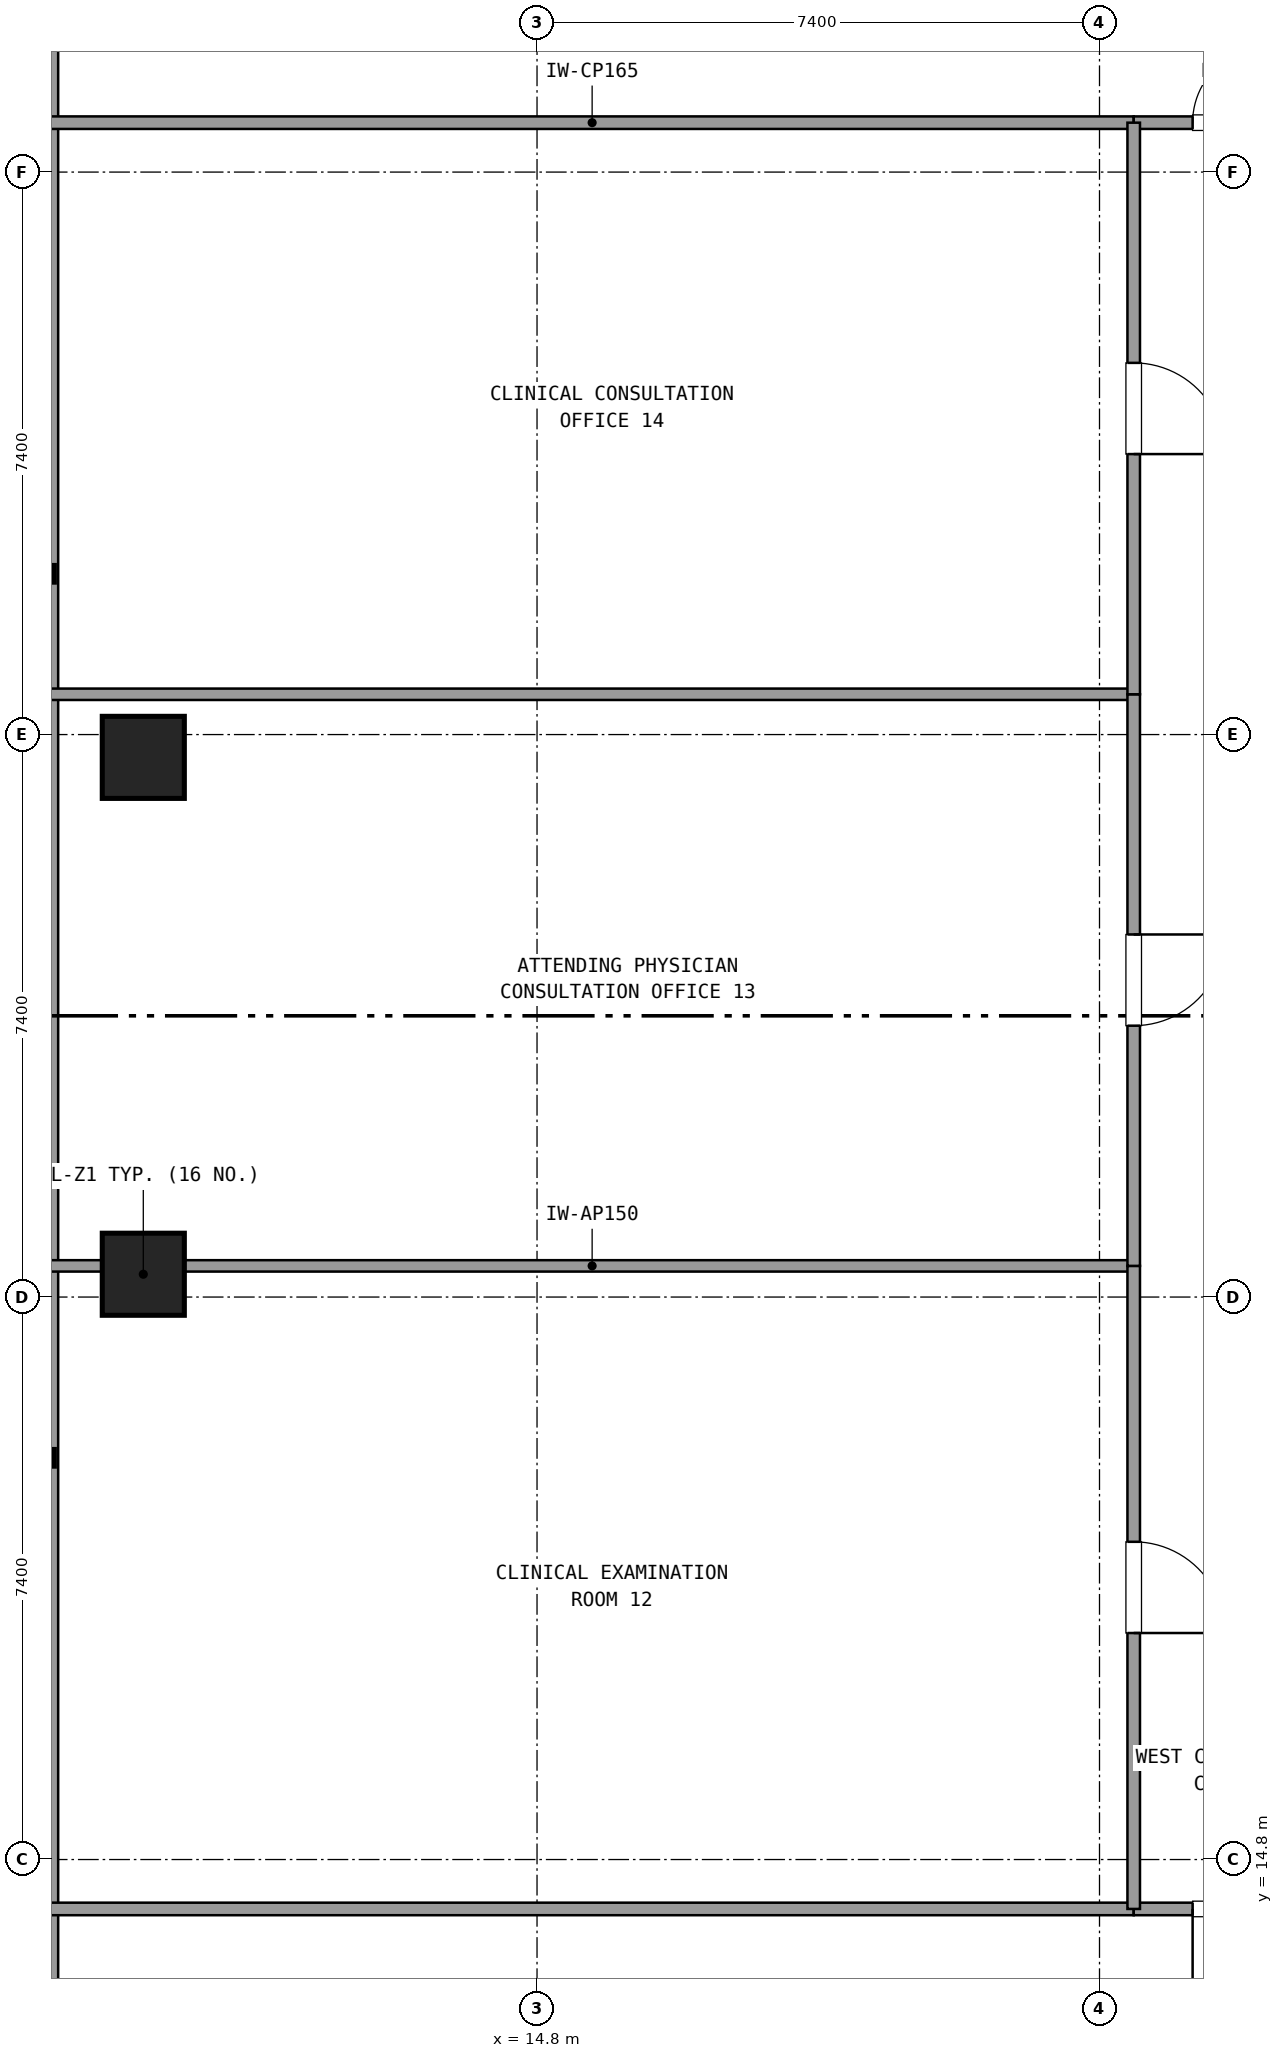
"""IFC4 building model, lengths in metres.
Left out: names, types, materials, properties, quantities, classifications, styles, units other than length and angle.
Written with IfcOpenShell. Run it as: python <this file> out.ifc"""

import sys

from ifc_helpers import new_model, si_unit, direction, frame, frame_2d, origin, origin_2d, place, context, subcontext, project, spatial, rectangle, extrude, element, fill, save


model = new_model("IFC4")
c1 = context("Model", 3, precision=1e-05, world=origin(), true_north=direction((0.0, 1.0)))
c2 = subcontext(c1, "Body", "Model", "MODEL_VIEW")
j1 = project(units=[si_unit("LENGTHUNIT", "METRE"), si_unit("PLANEANGLEUNIT", "RADIAN")], contexts=[c1])
p1 = place(None, origin())
s1 = spatial("IfcSite", under=j1, at=p1, CompositionType="ELEMENT")
p2 = place(p1, origin())
s2 = spatial("IfcBuilding", under=s1, at=p2, CompositionType="ELEMENT")
p3 = place(p2, frame((0.0, 0.0, 23.94)))
s3 = spatial("IfcBuildingStorey", under=s2, at=p3, CompositionType="ELEMENT", Elevation=23.94)
for number, where, z_axis, x_axis in (
    (1, (9.62, 22.5, 0.0), (0.0, 0.0, 1.0), (1.0, 0.0, 0.0)),
    (2, (9.62, 29.3, 0.0), (0.0, 0.0, 1.0), (1.0, 0.0, 0.0)),
):
    element("IfcColumn", number, at=place(p3, frame(where, z_axis=z_axis, x_axis=x_axis)), inside=s3, PredefinedType="COLUMN", context=c2, shape_type="SweptSolid", body=[
        extrude(rectangle(XDim=1.08, YDim=1.08, at=origin_2d()), origin(), (0.0, 0.0, 1.0), 3.6),
    ])
p4 = place(p3, frame((8.38, 43.345, 0.0), z_axis=(0.0, 0.0, 1.0), x_axis=(0.0, -1.0, 0.0)))
e3 = element("IfcWall", 3, at=p4, inside=s3, PredefinedType="SOLIDWALL", context=c2, shape_type="SweptSolid", body=[
    extrude(rectangle(XDim=34.89, YDim=0.24, at=frame_2d((17.445, 0.0))), origin(), (0.0, 0.0, 1.0), 0.85),
])
for number, where, z_axis, x_axis in (
    (4, (8.4, 37.65, 0.0), (0.0, 0.0, 1.0), (1.0, 0.0, 0.0)),
    (5, (8.4, 14.15, 0.0), (0.0, 0.0, 1.0), (1.0, 0.0, 0.0)),
):
    element("IfcWall", number, at=place(p3, frame(where, z_axis=z_axis, x_axis=x_axis)), inside=s3, PredefinedType="PARTITIONING", context=c2, shape_type="SweptSolid", body=[
        extrude(rectangle(XDim=14.25, YDim=0.165, at=frame_2d((7.125, 0.0))), origin(), (0.0, 0.0, 1.0), 2.61),
    ])
p5 = place(p3, frame((22.65, 37.65, 0.0), z_axis=(0.0, 0.0, 1.0), x_axis=(1.0, 0.0, 0.0)))
e6 = element("IfcWall", 6, at=p5, inside=s3, PredefinedType="PARTITIONING", context=c2, shape_type="SweptSolid", body=[
    extrude(rectangle(XDim=2.55, YDim=0.165, at=frame_2d((1.275, 0.0))), origin(), (0.0, 0.0, 1.0), 2.61),
])
p6 = place(p5, frame((0.775, 0.0, 0.0)))
e7 = element("IfcOpeningElement", 7, at=p6, cuts=e6, PredefinedType="OPENING", context=c2, shape_type="SweptSolid", body=[
    extrude(rectangle(XDim=1.0, YDim=2.15, at=frame_2d((0.5, 1.075))), frame((0.0, 0.093, 0.0), z_axis=(0.0, -1.0, 0.0), x_axis=(1.0, 0.0, 0.0)), (0.0, 0.0, 1.0), 0.185),
])
p7 = place(p3, frame((22.65, 14.15, 0.0), z_axis=(0.0, 0.0, 1.0), x_axis=(1.0, 0.0, 0.0)))
e8 = element("IfcWall", 8, at=p7, inside=s3, PredefinedType="PARTITIONING", context=c2, shape_type="SweptSolid", body=[
    extrude(rectangle(XDim=2.55, YDim=0.165, at=frame_2d((1.275, 0.0))), origin(), (0.0, 0.0, 1.0), 2.61),
])
p8 = place(p7, frame((0.775, 0.0, 0.0)))
e9 = element("IfcOpeningElement", 9, at=p8, cuts=e8, PredefinedType="OPENING", context=c2, shape_type="SweptSolid", body=[
    extrude(rectangle(XDim=1.0, YDim=2.15, at=frame_2d((0.5, 1.075))), frame((0.0, 0.093, 0.0), z_axis=(0.0, -1.0, 0.0), x_axis=(1.0, 0.0, 0.0)), (0.0, 0.0, 1.0), 0.185),
])
p9 = place(p3, frame((22.65, 22.61, 0.0), z_axis=(0.0, 0.0, 1.0), x_axis=(-1.0, 0.0, 0.0)))
e10 = element("IfcWall", 10, at=p9, inside=s3, PredefinedType="PARTITIONING", context=c2, shape_type="SweptSolid", body=[
    extrude(rectangle(XDim=14.25, YDim=0.15, at=frame_2d((7.125, 0.0))), origin(), (0.0, 0.0, 1.0), 2.61),
])
p10 = place(p3, frame((22.65, 14.15, 0.0), z_axis=(0.0, 0.0, 1.0), x_axis=(0.0, 1.0, 0.0)))
e11 = element("IfcWall", 11, at=p10, inside=s3, PredefinedType="PARTITIONING", context=c2, shape_type="SweptSolid", body=[
    extrude(rectangle(XDim=8.46, YDim=0.165, at=frame_2d((4.23, 0.0))), origin(), (0.0, 0.0, 1.0), 2.61),
])
p11 = place(p10, frame((3.63, 0.0, 0.0)))
e12 = element("IfcOpeningElement", 12, at=p11, cuts=e11, PredefinedType="OPENING", context=c2, shape_type="SweptSolid", body=[
    extrude(rectangle(XDim=1.2, YDim=2.15, at=frame_2d((0.6, 1.075))), frame((0.0, 0.093, 0.0), z_axis=(0.0, -1.0, 0.0), x_axis=(1.0, 0.0, 0.0)), (0.0, 0.0, 1.0), 0.185),
])
p12 = place(p3, frame((22.65, 30.13, 0.0), z_axis=(0.0, 0.0, 1.0), x_axis=(-1.0, 0.0, 0.0)))
e13 = element("IfcWall", 13, at=p12, inside=s3, PredefinedType="PARTITIONING", context=c2, shape_type="SweptSolid", body=[
    extrude(rectangle(XDim=14.25, YDim=0.15, at=frame_2d((7.125, 0.0))), origin(), (0.0, 0.0, 1.0), 2.61),
])
p13 = place(p3, frame((22.65, 22.61, 0.0), z_axis=(0.0, 0.0, 1.0), x_axis=(0.0, 1.0, 0.0)))
e14 = element("IfcWall", 14, at=p13, inside=s3, PredefinedType="PARTITIONING", context=c2, shape_type="SweptSolid", body=[
    extrude(rectangle(XDim=7.52, YDim=0.165, at=frame_2d((3.76, 0.0))), origin(), (0.0, 0.0, 1.0), 2.61),
])
p14 = place(p13, frame((3.16, 0.0, 0.0)))
e15 = element("IfcOpeningElement", 15, at=p14, cuts=e14, PredefinedType="OPENING", context=c2, shape_type="SweptSolid", body=[
    extrude(rectangle(XDim=1.2, YDim=2.15, at=frame_2d((0.6, 1.075))), frame((0.0, 0.093, 0.0), z_axis=(0.0, -1.0, 0.0), x_axis=(1.0, 0.0, 0.0)), (0.0, 0.0, 1.0), 0.185),
])
p15 = place(p3, frame((22.65, 30.13, 0.0), z_axis=(0.0, 0.0, 1.0), x_axis=(0.0, 1.0, 0.0)))
e16 = element("IfcWall", 16, at=p15, inside=s3, PredefinedType="PARTITIONING", context=c2, shape_type="SweptSolid", body=[
    extrude(rectangle(XDim=7.52, YDim=0.165, at=frame_2d((3.76, 0.0))), origin(), (0.0, 0.0, 1.0), 2.61),
])
p16 = place(p15, frame((3.16, 0.0, 0.0)))
e17 = element("IfcOpeningElement", 17, at=p16, cuts=e16, PredefinedType="OPENING", context=c2, shape_type="SweptSolid", body=[
    extrude(rectangle(XDim=1.2, YDim=2.15, at=frame_2d((0.6, 1.075))), frame((0.0, 0.093, 0.0), z_axis=(0.0, -1.0, 0.0), x_axis=(1.0, 0.0, 0.0)), (0.0, 0.0, 1.0), 0.185),
])
p17 = place(p6, origin())
e18 = element("IfcDoor", 18, at=p17, inside=s3, OperationType="SINGLE_SWING_RIGHT", PredefinedType="DOOR", context=c2, shape_type="SweptSolid", body=[
    extrude(rectangle(XDim=1.0, YDim=2.15, at=frame_2d((0.5, 1.075))), frame((0.0, 0.025, 0.0), z_axis=(0.0, -1.0, 0.0), x_axis=(1.0, 0.0, 0.0)), (0.0, 0.0, 1.0), 0.05),
])
fill(e7, e18)
p18 = place(p8, frame((1.0, 0.0, 0.0), z_axis=(0.0, 0.0, 1.0), x_axis=(-1.0, 0.0, 0.0)))
e19 = element("IfcDoor", 19, at=p18, inside=s3, OperationType="SINGLE_SWING_LEFT", PredefinedType="DOOR", context=c2, shape_type="SweptSolid", body=[
    extrude(rectangle(XDim=1.0, YDim=2.15, at=frame_2d((0.5, 1.075))), frame((0.0, 0.025, 0.0), z_axis=(0.0, -1.0, 0.0), x_axis=(1.0, 0.0, 0.0)), (0.0, 0.0, 1.0), 0.05),
])
fill(e9, e19)
p19 = place(p11, frame((1.2, 0.0, 0.0), z_axis=(0.0, 0.0, 1.0), x_axis=(-1.0, 0.0, 0.0)))
e20 = element("IfcDoor", 20, at=p19, inside=s3, OperationType="SINGLE_SWING_LEFT", PredefinedType="DOOR", context=c2, shape_type="SweptSolid", body=[
    extrude(rectangle(XDim=1.2, YDim=2.15, at=frame_2d((0.6, 1.075))), frame((0.0, 0.025, 0.0), z_axis=(0.0, -1.0, 0.0), x_axis=(1.0, 0.0, 0.0)), (0.0, 0.0, 1.0), 0.05),
])
fill(e12, e20)
p20 = place(p14, frame((1.2, 0.0, 0.0), z_axis=(0.0, 0.0, 1.0), x_axis=(-1.0, 0.0, 0.0)))
e21 = element("IfcDoor", 21, at=p20, inside=s3, OperationType="SINGLE_SWING_RIGHT", PredefinedType="DOOR", context=c2, shape_type="SweptSolid", body=[
    extrude(rectangle(XDim=1.2, YDim=2.15, at=frame_2d((0.6, 1.075))), frame((0.0, 0.025, 0.0), z_axis=(0.0, -1.0, 0.0), x_axis=(1.0, 0.0, 0.0)), (0.0, 0.0, 1.0), 0.05),
])
fill(e15, e21)
p21 = place(p16, frame((1.2, 0.0, 0.0), z_axis=(0.0, 0.0, 1.0), x_axis=(-1.0, 0.0, 0.0)))
e22 = element("IfcDoor", 22, at=p21, inside=s3, OperationType="SINGLE_SWING_LEFT", PredefinedType="DOOR", context=c2, shape_type="SweptSolid", body=[
    extrude(rectangle(XDim=1.2, YDim=2.15, at=frame_2d((0.6, 1.075))), frame((0.0, 0.025, 0.0), z_axis=(0.0, -1.0, 0.0), x_axis=(1.0, 0.0, 0.0)), (0.0, 0.0, 1.0), 0.05),
])
fill(e17, e22)
save(model, sys.argv[1])
